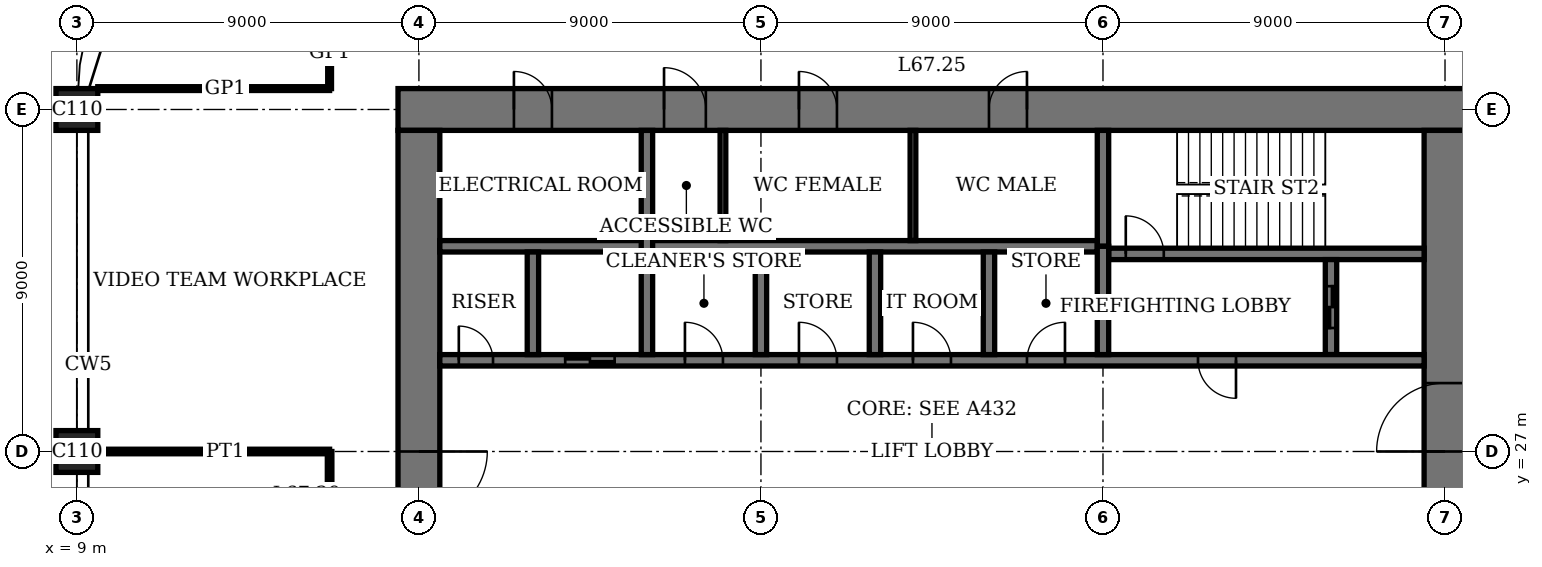
"""IFC4 building model, lengths in metres.
Left out: names, types, materials, properties, quantities, classifications, styles, units other than length and angle.
Written with IfcOpenShell. Run it as: python <this file> out.ifc"""

import sys

from ifc_helpers import new_model, si_unit, direction, frame, frame_2d, origin, origin_2d, place, context, subcontext, project, spatial, rectangle, extrude, element, fill, save


model = new_model("IFC4")
c1 = context("Model", 3, precision=1e-05, world=origin(), true_north=direction((0.0, 1.0)))
c2 = subcontext(c1, "Body", "Model", "MODEL_VIEW")
j1 = project(units=[si_unit("LENGTHUNIT", "METRE"), si_unit("PLANEANGLEUNIT", "RADIAN")], contexts=[c1])
p1 = place(None, origin())
s1 = spatial("IfcSite", under=j1, at=p1, CompositionType="ELEMENT")
p2 = place(p1, origin())
s2 = spatial("IfcBuilding", under=s1, at=p2, CompositionType="ELEMENT")
p3 = place(p2, frame((0.0, 0.0, 275.4)))
s3 = spatial("IfcBuildingStorey", under=s2, at=p3, CompositionType="ELEMENT", Elevation=275.4)
for number, where, z_axis, x_axis in (
    (1, (9.0, 27.0, 0.0), (0.0, 0.0, 1.0), (1.0, 0.0, 0.0)),
    (2, (9.0, 36.0, 0.0), (0.0, 0.0, 1.0), (1.0, 0.0, 0.0)),
):
    element("IfcColumn", number, at=place(p3, frame(where, z_axis=z_axis, x_axis=x_axis)), inside=s3, PredefinedType="COLUMN", context=c2, shape_type="SweptSolid", body=[
        extrude(rectangle(XDim=1.1, YDim=1.1, at=origin_2d()), origin(), (0.0, 0.0, 1.0), 4.0),
    ])
p4 = place(p3, frame((45.55, 36.0, 0.0), z_axis=(0.0, 0.0, 1.0), x_axis=(-1.0, 0.0, 0.0)))
e3 = element("IfcWall", 3, at=p4, inside=s3, PredefinedType="SHEAR", context=c2, shape_type="SweptSolid", body=[
    extrude(rectangle(XDim=28.1, YDim=1.1, at=frame_2d((14.05, 0.0))), origin(), (0.0, 0.0, 1.0), 4.0),
])
p5 = place(p4, frame((11.55, 0.0, 0.0)))
e4 = element("IfcOpeningElement", 4, at=p5, cuts=e3, PredefinedType="OPENING", context=c2, shape_type="SweptSolid", body=[
    extrude(rectangle(XDim=1.0, YDim=2.4, at=frame_2d((0.5, 1.2))), frame((0.0, 0.56, 0.0), z_axis=(0.0, -1.0, 0.0), x_axis=(1.0, 0.0, 0.0)), (0.0, 0.0, 1.0), 1.12),
])
p6 = place(p4, frame((16.55, 0.0, 0.0)))
e5 = element("IfcOpeningElement", 5, at=p6, cuts=e3, PredefinedType="OPENING", context=c2, shape_type="SweptSolid", body=[
    extrude(rectangle(XDim=1.0, YDim=2.4, at=frame_2d((0.5, 1.2))), frame((0.0, 0.56, 0.0), z_axis=(0.0, -1.0, 0.0), x_axis=(1.0, 0.0, 0.0)), (0.0, 0.0, 1.0), 1.12),
])
p7 = place(p4, frame((20.0, 0.0, 0.0)))
e6 = element("IfcOpeningElement", 6, at=p7, cuts=e3, PredefinedType="OPENING", context=c2, shape_type="SweptSolid", body=[
    extrude(rectangle(XDim=1.1, YDim=2.4, at=frame_2d((0.55, 1.2))), frame((0.0, 0.56, 0.0), z_axis=(0.0, -1.0, 0.0), x_axis=(1.0, 0.0, 0.0)), (0.0, 0.0, 1.0), 1.12),
])
p8 = place(p4, frame((24.05, 0.0, 0.0)))
e7 = element("IfcOpeningElement", 7, at=p8, cuts=e3, PredefinedType="OPENING", context=c2, shape_type="SweptSolid", body=[
    extrude(rectangle(XDim=1.0, YDim=2.4, at=frame_2d((0.5, 1.2))), frame((0.0, 0.56, 0.0), z_axis=(0.0, -1.0, 0.0), x_axis=(1.0, 0.0, 0.0)), (0.0, 0.0, 1.0), 1.12),
])
p9 = place(p3, frame((18.0, 35.45, 0.0), z_axis=(0.0, 0.0, 1.0), x_axis=(0.0, -1.0, 0.0)))
e8 = element("IfcWall", 8, at=p9, inside=s3, PredefinedType="SHEAR", context=c2, shape_type="SweptSolid", body=[
    extrude(rectangle(XDim=16.9, YDim=1.1, at=frame_2d((8.45, 0.0))), origin(), (0.0, 0.0, 1.0), 4.0),
])
p10 = place(p9, frame((8.45, 0.0, 0.0)))
e9 = element("IfcOpeningElement", 9, at=p10, cuts=e8, PredefinedType="OPENING", context=c2, shape_type="SweptSolid", body=[
    extrude(rectangle(XDim=1.8, YDim=2.4, at=frame_2d((0.9, 1.2))), frame((0.0, 0.56, 0.0), z_axis=(0.0, -1.0, 0.0), x_axis=(1.0, 0.0, 0.0)), (0.0, 0.0, 1.0), 1.12),
])
p11 = place(p3, frame((45.0, 18.55, 0.0), z_axis=(0.0, 0.0, 1.0), x_axis=(0.0, 1.0, 0.0)))
e10 = element("IfcWall", 10, at=p11, inside=s3, PredefinedType="SHEAR", context=c2, shape_type="SweptSolid", body=[
    extrude(rectangle(XDim=16.9, YDim=1.1, at=frame_2d((8.45, 0.0))), origin(), (0.0, 0.0, 1.0), 4.0),
])
p12 = place(p11, frame((8.45, 0.0, 0.0)))
e11 = element("IfcOpeningElement", 11, at=p12, cuts=e10, PredefinedType="OPENING", context=c2, shape_type="SweptSolid", body=[
    extrude(rectangle(XDim=1.8, YDim=2.4, at=frame_2d((0.9, 1.2))), frame((0.0, 0.56, 0.0), z_axis=(0.0, -1.0, 0.0), x_axis=(1.0, 0.0, 0.0)), (0.0, 0.0, 1.0), 1.12),
])
p13 = place(p3, frame((36.15, 32.2, 0.0), z_axis=(0.0, 0.0, 1.0), x_axis=(1.0, 0.0, 0.0)))
e12 = element("IfcWall", 12, at=p13, inside=s3, PredefinedType="SHEAR", context=c2, shape_type="SweptSolid", body=[
    extrude(rectangle(XDim=8.3, YDim=0.3, at=frame_2d((4.15, 0.0))), origin(), (0.0, 0.0, 1.0), 4.0),
])
p14 = place(p13, frame((0.45, 0.0, 0.0)))
e13 = element("IfcOpeningElement", 13, at=p14, cuts=e12, PredefinedType="OPENING", context=c2, shape_type="SweptSolid", body=[
    extrude(rectangle(XDim=1.0, YDim=2.4, at=frame_2d((0.5, 1.2))), frame((0.0, 0.16, 0.0), z_axis=(0.0, -1.0, 0.0), x_axis=(1.0, 0.0, 0.0)), (0.0, 0.0, 1.0), 0.32),
])
p15 = place(p3, frame((36.0, 32.4, 0.0), z_axis=(0.0, 0.0, 1.0), x_axis=(0.0, 1.0, 0.0)))
e14 = element("IfcWall", 14, at=p15, inside=s3, PredefinedType="SHEAR", context=c2, shape_type="SweptSolid", body=[
    extrude(rectangle(XDim=3.05, YDim=0.3, at=frame_2d((1.525, 0.0))), origin(), (0.0, 0.0, 1.0), 4.0),
])
p16 = place(p3, frame((42.0, 29.55, 0.0), z_axis=(0.0, 0.0, 1.0), x_axis=(0.0, 1.0, 0.0)))
e15 = element("IfcWall", 15, at=p16, inside=s3, PredefinedType="SHEAR", context=c2, shape_type="SweptSolid", body=[
    extrude(rectangle(XDim=2.5, YDim=0.3, at=frame_2d((1.25, 0.0))), origin(), (0.0, 0.0, 1.0), 4.0),
])
p17 = place(p16, frame((0.7, 0.0, 0.0)))
e16 = element("IfcOpeningElement", 16, at=p17, cuts=e15, PredefinedType="OPENING", context=c2, shape_type="SweptSolid", body=[
    extrude(rectangle(XDim=1.1, YDim=2.4, at=frame_2d((0.55, 1.2))), frame((0.0, 0.16, 0.0), z_axis=(0.0, -1.0, 0.0), x_axis=(1.0, 0.0, 0.0)), (0.0, 0.0, 1.0), 0.32),
])
p18 = place(p3, frame((18.55, 29.4, 0.0), z_axis=(0.0, 0.0, 1.0), x_axis=(1.0, 0.0, 0.0)))
e17 = element("IfcWall", 17, at=p18, inside=s3, PredefinedType="SHEAR", context=c2, shape_type="SweptSolid", body=[
    extrude(rectangle(XDim=25.9, YDim=0.3, at=frame_2d((12.95, 0.0))), origin(), (0.0, 0.0, 1.0), 4.0),
])
p19 = place(p18, frame((19.95, 0.0, 0.0)))
e18 = element("IfcOpeningElement", 18, at=p19, cuts=e17, PredefinedType="OPENING", context=c2, shape_type="SweptSolid", body=[
    extrude(rectangle(XDim=1.0, YDim=2.4, at=frame_2d((0.5, 1.2))), frame((0.0, 0.16, 0.0), z_axis=(0.0, -1.0, 0.0), x_axis=(1.0, 0.0, 0.0)), (0.0, 0.0, 1.0), 0.32),
])
p20 = place(p18, frame((0.5, 0.0, 0.0)))
e19 = element("IfcOpeningElement", 19, at=p20, cuts=e17, PredefinedType="OPENING", context=c2, shape_type="SweptSolid", body=[
    extrude(rectangle(XDim=0.9, YDim=2.1, at=frame_2d((0.45, 1.05))), frame((0.0, 0.16, 0.0), z_axis=(0.0, -1.0, 0.0), x_axis=(1.0, 0.0, 0.0)), (0.0, 0.0, 1.0), 0.32),
])
p21 = place(p18, frame((15.45, 0.0, 0.0)))
e20 = element("IfcOpeningElement", 20, at=p21, cuts=e17, PredefinedType="OPENING", context=c2, shape_type="SweptSolid", body=[
    extrude(rectangle(XDim=1.0, YDim=2.4, at=frame_2d((0.5, 1.2))), frame((0.0, 0.16, 0.0), z_axis=(0.0, -1.0, 0.0), x_axis=(1.0, 0.0, 0.0)), (0.0, 0.0, 1.0), 0.32),
])
p22 = place(p18, frame((12.45, 0.0, 0.0)))
e21 = element("IfcOpeningElement", 21, at=p22, cuts=e17, PredefinedType="OPENING", context=c2, shape_type="SweptSolid", body=[
    extrude(rectangle(XDim=1.0, YDim=2.4, at=frame_2d((0.5, 1.2))), frame((0.0, 0.16, 0.0), z_axis=(0.0, -1.0, 0.0), x_axis=(1.0, 0.0, 0.0)), (0.0, 0.0, 1.0), 0.32),
])
p23 = place(p18, frame((9.45, 0.0, 0.0)))
e22 = element("IfcOpeningElement", 22, at=p23, cuts=e17, PredefinedType="OPENING", context=c2, shape_type="SweptSolid", body=[
    extrude(rectangle(XDim=1.0, YDim=2.4, at=frame_2d((0.5, 1.2))), frame((0.0, 0.16, 0.0), z_axis=(0.0, -1.0, 0.0), x_axis=(1.0, 0.0, 0.0)), (0.0, 0.0, 1.0), 0.32),
])
p24 = place(p18, frame((6.45, 0.0, 0.0)))
e23 = element("IfcOpeningElement", 23, at=p24, cuts=e17, PredefinedType="OPENING", context=c2, shape_type="SweptSolid", body=[
    extrude(rectangle(XDim=1.0, YDim=2.4, at=frame_2d((0.5, 1.2))), frame((0.0, 0.16, 0.0), z_axis=(0.0, -1.0, 0.0), x_axis=(1.0, 0.0, 0.0)), (0.0, 0.0, 1.0), 0.32),
])
p25 = place(p18, frame((3.3, 0.0, 0.0)))
e24 = element("IfcOpeningElement", 24, at=p25, cuts=e17, PredefinedType="OPENING", context=c2, shape_type="SweptSolid", body=[
    extrude(rectangle(XDim=1.3, YDim=2.4, at=frame_2d((0.65, 1.2))), frame((0.0, 0.16, 0.0), z_axis=(0.0, -1.0, 0.0), x_axis=(1.0, 0.0, 0.0)), (0.0, 0.0, 1.0), 0.32),
])
p26 = place(p3, frame((18.55, 32.4, 0.0), z_axis=(0.0, 0.0, 1.0), x_axis=(1.0, 0.0, 0.0)))
e25 = element("IfcWall", 25, at=p26, inside=s3, PredefinedType="SHEAR", context=c2, shape_type="SweptSolid", body=[
    extrude(rectangle(XDim=17.3, YDim=0.3, at=frame_2d((8.65, 0.0))), origin(), (0.0, 0.0, 1.0), 4.0),
])
for number, where, z_axis, x_axis in (
    (26, (33.0, 29.55, 0.0), (0.0, 0.0, 1.0), (0.0, 1.0, 0.0)),
    (27, (30.0, 29.55, 0.0), (0.0, 0.0, 1.0), (0.0, 1.0, 0.0)),
    (28, (27.0, 29.55, 0.0), (0.0, 0.0, 1.0), (0.0, 1.0, 0.0)),
):
    element("IfcWall", number, at=place(p3, frame(where, z_axis=z_axis, x_axis=x_axis)), inside=s3, PredefinedType="SHEAR", context=c2, shape_type="SweptSolid", body=[
        extrude(rectangle(XDim=2.7, YDim=0.3, at=frame_2d((1.35, 0.0))), origin(), (0.0, 0.0, 1.0), 4.0),
    ])
p27 = place(p3, frame((24.0, 29.55, 0.0), z_axis=(0.0, 0.0, 1.0), x_axis=(0.0, 1.0, 0.0)))
e29 = element("IfcWall", 29, at=p27, inside=s3, PredefinedType="SHEAR", context=c2, shape_type="SweptSolid", body=[
    extrude(rectangle(XDim=5.9, YDim=0.3, at=frame_2d((2.95, 0.0))), origin(), (0.0, 0.0, 1.0), 4.0),
])
p28 = place(p3, frame((21.0, 29.55, 0.0), z_axis=(0.0, 0.0, 1.0), x_axis=(0.0, 1.0, 0.0)))
e30 = element("IfcWall", 30, at=p28, inside=s3, PredefinedType="SHEAR", context=c2, shape_type="SweptSolid", body=[
    extrude(rectangle(XDim=2.7, YDim=0.3, at=frame_2d((1.35, 0.0))), origin(), (0.0, 0.0, 1.0), 4.0),
])
p29 = place(p3, frame((36.0, 29.55, 0.0), z_axis=(0.0, 0.0, 1.0), x_axis=(0.0, 1.0, 0.0)))
e31 = element("IfcWall", 31, at=p29, inside=s3, PredefinedType="SHEAR", context=c2, shape_type="SweptSolid", body=[
    extrude(rectangle(XDim=2.85, YDim=0.3, at=frame_2d((1.425, 0.0))), origin(), (0.0, 0.0, 1.0), 4.0),
])
p30 = place(p3, frame((9.55, 27.0, 0.0), z_axis=(0.0, 0.0, 1.0), x_axis=(1.0, 0.0, 0.0)))
e32 = element("IfcWall", 32, at=p30, inside=s3, PredefinedType="PARTITIONING", context=c2, shape_type="SweptSolid", body=[
    extrude(rectangle(XDim=6.1, YDim=0.12, at=frame_2d((3.05, 0.0))), origin(), (0.0, 0.0, 1.0), 3.05),
])
p31 = place(p3, frame((9.55, 36.55, 0.0), z_axis=(0.0, 0.0, 1.0), x_axis=(1.0, 0.0, 0.0)))
e33 = element("IfcWall", 33, at=p31, inside=s3, PredefinedType="PARTITIONING", context=c2, shape_type="SweptSolid", body=[
    extrude(rectangle(XDim=6.1, YDim=0.1, at=frame_2d((3.05, 0.0))), origin(), (0.0, 0.0, 1.0), 3.75),
])
p32 = place(p3, frame((15.65, 22.5, 0.0), z_axis=(0.0, 0.0, 1.0), x_axis=(0.0, 1.0, 0.0)))
e34 = element("IfcWall", 34, at=p32, inside=s3, PredefinedType="PARTITIONING", context=c2, shape_type="SweptSolid", body=[
    extrude(rectangle(XDim=4.5, YDim=0.12, at=frame_2d((2.25, 0.0))), origin(), (0.0, 0.0, 1.0), 3.75),
])
p33 = place(p32, frame((1.75, 0.0, 0.0)))
e35 = element("IfcOpeningElement", 35, at=p33, cuts=e34, PredefinedType="OPENING", context=c2, shape_type="SweptSolid", body=[
    extrude(rectangle(XDim=1.0, YDim=2.4, at=frame_2d((0.5, 1.2))), frame((0.0, 0.07, 0.0), z_axis=(0.0, -1.0, 0.0), x_axis=(1.0, 0.0, 0.0)), (0.0, 0.0, 1.0), 0.14),
])
p34 = place(p3, frame((15.65, 36.55, 0.0), z_axis=(0.0, 0.0, 1.0), x_axis=(0.0, 1.0, 0.0)))
e36 = element("IfcWall", 36, at=p34, inside=s3, PredefinedType="PARTITIONING", context=c2, shape_type="SweptSolid", body=[
    extrude(rectangle(XDim=1.85, YDim=0.1, at=frame_2d((0.925, 0.0))), origin(), (0.0, 0.0, 1.0), 3.75),
])
for number, where, z_axis, x_axis in (
    (37, (31.0, 32.55, 0.0), (0.0, 0.0, 1.0), (0.0, 1.0, 0.0)),
    (38, (26.0, 32.55, 0.0), (0.0, 0.0, 1.0), (0.0, 1.0, 0.0)),
):
    element("IfcWall", number, at=place(p3, frame(where, z_axis=z_axis, x_axis=x_axis)), inside=s3, PredefinedType="PARTITIONING", context=c2, shape_type="SweptSolid", body=[
        extrude(rectangle(XDim=2.9, YDim=0.15, at=frame_2d((1.45, 0.0))), origin(), (0.0, 0.0, 1.0), 3.75),
    ])
p35 = place(p10, origin())
e39 = element("IfcDoor", 39, at=p35, inside=s3, OperationType="DOUBLE_DOOR_DOUBLE_SWING", PredefinedType="DOOR", context=c2, shape_type="SweptSolid", body=[
    extrude(rectangle(XDim=1.8, YDim=2.4, at=frame_2d((0.9, 1.2))), frame((0.0, 0.03, 0.0), z_axis=(0.0, -1.0, 0.0), x_axis=(1.0, 0.0, 0.0)), (0.0, 0.0, 1.0), 0.06),
    extrude(rectangle(XDim=0.04, YDim=2.4, at=frame_2d((0.02, 1.2))), frame((0.0, 0.55, 0.0), z_axis=(0.0, -1.0, 0.0), x_axis=(1.0, 0.0, 0.0)), (0.0, 0.0, 1.0), 1.1),
    extrude(rectangle(XDim=0.04, YDim=2.4, at=frame_2d((1.78, 1.2))), frame((0.0, 0.55, 0.0), z_axis=(0.0, -1.0, 0.0), x_axis=(1.0, 0.0, 0.0)), (0.0, 0.0, 1.0), 1.1),
    extrude(rectangle(XDim=1.8, YDim=0.04, at=frame_2d((0.9, 2.38))), frame((0.0, 0.55, 0.0), z_axis=(0.0, -1.0, 0.0), x_axis=(1.0, 0.0, 0.0)), (0.0, 0.0, 1.0), 1.1),
])
fill(e9, e39)
p36 = place(p12, origin())
e40 = element("IfcDoor", 40, at=p36, inside=s3, OperationType="DOUBLE_DOOR_DOUBLE_SWING", PredefinedType="DOOR", context=c2, shape_type="SweptSolid", body=[
    extrude(rectangle(XDim=1.8, YDim=2.4, at=frame_2d((0.9, 1.2))), frame((0.0, 0.03, 0.0), z_axis=(0.0, -1.0, 0.0), x_axis=(1.0, 0.0, 0.0)), (0.0, 0.0, 1.0), 0.06),
    extrude(rectangle(XDim=0.04, YDim=2.4, at=frame_2d((0.02, 1.2))), frame((0.0, 0.55, 0.0), z_axis=(0.0, -1.0, 0.0), x_axis=(1.0, 0.0, 0.0)), (0.0, 0.0, 1.0), 1.1),
    extrude(rectangle(XDim=0.04, YDim=2.4, at=frame_2d((1.78, 1.2))), frame((0.0, 0.55, 0.0), z_axis=(0.0, -1.0, 0.0), x_axis=(1.0, 0.0, 0.0)), (0.0, 0.0, 1.0), 1.1),
    extrude(rectangle(XDim=1.8, YDim=0.04, at=frame_2d((0.9, 2.38))), frame((0.0, 0.55, 0.0), z_axis=(0.0, -1.0, 0.0), x_axis=(1.0, 0.0, 0.0)), (0.0, 0.0, 1.0), 1.1),
])
fill(e11, e40)
p37 = place(p5, origin())
e41 = element("IfcDoor", 41, at=p37, inside=s3, OperationType="SINGLE_SWING_LEFT", PredefinedType="DOOR", context=c2, shape_type="SweptSolid", body=[
    extrude(rectangle(XDim=1.0, YDim=2.4, at=frame_2d((0.5, 1.2))), frame((0.0, 0.025, 0.0), z_axis=(0.0, -1.0, 0.0), x_axis=(1.0, 0.0, 0.0)), (0.0, 0.0, 1.0), 0.05),
    extrude(rectangle(XDim=0.04, YDim=2.4, at=frame_2d((0.02, 1.2))), frame((0.0, 0.4, 0.0), z_axis=(0.0, -1.0, 0.0), x_axis=(1.0, 0.0, 0.0)), (0.0, 0.0, 1.0), 0.8),
    extrude(rectangle(XDim=0.04, YDim=2.4, at=frame_2d((0.98, 1.2))), frame((0.0, 0.4, 0.0), z_axis=(0.0, -1.0, 0.0), x_axis=(1.0, 0.0, 0.0)), (0.0, 0.0, 1.0), 0.8),
    extrude(rectangle(XDim=1.0, YDim=0.04, at=frame_2d((0.5, 2.38))), frame((0.0, 0.4, 0.0), z_axis=(0.0, -1.0, 0.0), x_axis=(1.0, 0.0, 0.0)), (0.0, 0.0, 1.0), 0.8),
])
fill(e4, e41)
p38 = place(p6, origin())
e42 = element("IfcDoor", 42, at=p38, inside=s3, OperationType="SINGLE_SWING_RIGHT", PredefinedType="DOOR", context=c2, shape_type="SweptSolid", body=[
    extrude(rectangle(XDim=1.0, YDim=2.4, at=frame_2d((0.5, 1.2))), frame((0.0, 0.025, 0.0), z_axis=(0.0, -1.0, 0.0), x_axis=(1.0, 0.0, 0.0)), (0.0, 0.0, 1.0), 0.05),
    extrude(rectangle(XDim=0.04, YDim=2.4, at=frame_2d((0.02, 1.2))), frame((0.0, 0.4, 0.0), z_axis=(0.0, -1.0, 0.0), x_axis=(1.0, 0.0, 0.0)), (0.0, 0.0, 1.0), 0.8),
    extrude(rectangle(XDim=0.04, YDim=2.4, at=frame_2d((0.98, 1.2))), frame((0.0, 0.4, 0.0), z_axis=(0.0, -1.0, 0.0), x_axis=(1.0, 0.0, 0.0)), (0.0, 0.0, 1.0), 0.8),
    extrude(rectangle(XDim=1.0, YDim=0.04, at=frame_2d((0.5, 2.38))), frame((0.0, 0.4, 0.0), z_axis=(0.0, -1.0, 0.0), x_axis=(1.0, 0.0, 0.0)), (0.0, 0.0, 1.0), 0.8),
])
fill(e5, e42)
p39 = place(p7, origin())
e43 = element("IfcDoor", 43, at=p39, inside=s3, OperationType="SINGLE_SWING_RIGHT", PredefinedType="DOOR", context=c2, shape_type="SweptSolid", body=[
    extrude(rectangle(XDim=1.1, YDim=2.4, at=frame_2d((0.55, 1.2))), frame((0.0, 0.025, 0.0), z_axis=(0.0, -1.0, 0.0), x_axis=(1.0, 0.0, 0.0)), (0.0, 0.0, 1.0), 0.05),
    extrude(rectangle(XDim=0.04, YDim=2.4, at=frame_2d((0.02, 1.2))), frame((0.0, 0.44, 0.0), z_axis=(0.0, -1.0, 0.0), x_axis=(1.0, 0.0, 0.0)), (0.0, 0.0, 1.0), 0.88),
    extrude(rectangle(XDim=0.04, YDim=2.4, at=frame_2d((1.08, 1.2))), frame((0.0, 0.44, 0.0), z_axis=(0.0, -1.0, 0.0), x_axis=(1.0, 0.0, 0.0)), (0.0, 0.0, 1.0), 0.88),
    extrude(rectangle(XDim=1.1, YDim=0.04, at=frame_2d((0.55, 2.38))), frame((0.0, 0.44, 0.0), z_axis=(0.0, -1.0, 0.0), x_axis=(1.0, 0.0, 0.0)), (0.0, 0.0, 1.0), 0.88),
])
fill(e6, e43)
p40 = place(p8, origin())
e44 = element("IfcDoor", 44, at=p40, inside=s3, OperationType="SINGLE_SWING_RIGHT", PredefinedType="DOOR", context=c2, shape_type="SweptSolid", body=[
    extrude(rectangle(XDim=1.0, YDim=2.4, at=frame_2d((0.5, 1.2))), frame((0.0, 0.025, 0.0), z_axis=(0.0, -1.0, 0.0), x_axis=(1.0, 0.0, 0.0)), (0.0, 0.0, 1.0), 0.05),
    extrude(rectangle(XDim=0.04, YDim=2.4, at=frame_2d((0.02, 1.2))), frame((0.0, 0.4, 0.0), z_axis=(0.0, -1.0, 0.0), x_axis=(1.0, 0.0, 0.0)), (0.0, 0.0, 1.0), 0.8),
    extrude(rectangle(XDim=0.04, YDim=2.4, at=frame_2d((0.98, 1.2))), frame((0.0, 0.4, 0.0), z_axis=(0.0, -1.0, 0.0), x_axis=(1.0, 0.0, 0.0)), (0.0, 0.0, 1.0), 0.8),
    extrude(rectangle(XDim=1.0, YDim=0.04, at=frame_2d((0.5, 2.38))), frame((0.0, 0.4, 0.0), z_axis=(0.0, -1.0, 0.0), x_axis=(1.0, 0.0, 0.0)), (0.0, 0.0, 1.0), 0.8),
])
fill(e7, e44)
p41 = place(p14, origin())
e45 = element("IfcDoor", 45, at=p41, inside=s3, OperationType="SINGLE_SWING_RIGHT", PredefinedType="DOOR", context=c2, shape_type="SweptSolid", body=[
    extrude(rectangle(XDim=1.0, YDim=2.4, at=frame_2d((0.5, 1.2))), frame((0.0, 0.03, 0.0), z_axis=(0.0, -1.0, 0.0), x_axis=(1.0, 0.0, 0.0)), (0.0, 0.0, 1.0), 0.06),
])
fill(e13, e45)
p42 = place(p19, origin())
e46 = element("IfcDoor", 46, at=p42, inside=s3, OperationType="SINGLE_SWING_RIGHT", PredefinedType="DOOR", context=c2, shape_type="SweptSolid", body=[
    extrude(rectangle(XDim=1.0, YDim=2.4, at=frame_2d((0.5, 1.2))), frame((0.0, 0.03, 0.0), z_axis=(0.0, -1.0, 0.0), x_axis=(1.0, 0.0, 0.0)), (0.0, 0.0, 1.0), 0.06),
])
fill(e18, e46)
p43 = place(p20, origin())
e47 = element("IfcDoor", 47, at=p43, inside=s3, OperationType="SINGLE_SWING_RIGHT", PredefinedType="DOOR", context=c2, shape_type="SweptSolid", body=[
    extrude(rectangle(XDim=0.9, YDim=2.1, at=frame_2d((0.45, 1.05))), frame((0.0, 0.03, 0.0), z_axis=(0.0, -1.0, 0.0), x_axis=(1.0, 0.0, 0.0)), (0.0, 0.0, 1.0), 0.06),
])
fill(e19, e47)
p44 = place(p21, origin())
e48 = element("IfcDoor", 48, at=p44, inside=s3, OperationType="SINGLE_SWING_LEFT", PredefinedType="DOOR", context=c2, shape_type="SweptSolid", body=[
    extrude(rectangle(XDim=1.0, YDim=2.4, at=frame_2d((0.5, 1.2))), frame((0.0, 0.03, 0.0), z_axis=(0.0, -1.0, 0.0), x_axis=(1.0, 0.0, 0.0)), (0.0, 0.0, 1.0), 0.06),
])
fill(e20, e48)
p45 = place(p22, origin())
e49 = element("IfcDoor", 49, at=p45, inside=s3, OperationType="SINGLE_SWING_RIGHT", PredefinedType="DOOR", context=c2, shape_type="SweptSolid", body=[
    extrude(rectangle(XDim=1.0, YDim=2.4, at=frame_2d((0.5, 1.2))), frame((0.0, 0.03, 0.0), z_axis=(0.0, -1.0, 0.0), x_axis=(1.0, 0.0, 0.0)), (0.0, 0.0, 1.0), 0.06),
])
fill(e21, e49)
p46 = place(p23, origin())
e50 = element("IfcDoor", 50, at=p46, inside=s3, OperationType="SINGLE_SWING_RIGHT", PredefinedType="DOOR", context=c2, shape_type="SweptSolid", body=[
    extrude(rectangle(XDim=1.0, YDim=2.4, at=frame_2d((0.5, 1.2))), frame((0.0, 0.03, 0.0), z_axis=(0.0, -1.0, 0.0), x_axis=(1.0, 0.0, 0.0)), (0.0, 0.0, 1.0), 0.06),
])
fill(e22, e50)
p47 = place(p24, origin())
e51 = element("IfcDoor", 51, at=p47, inside=s3, OperationType="SINGLE_SWING_RIGHT", PredefinedType="DOOR", context=c2, shape_type="SweptSolid", body=[
    extrude(rectangle(XDim=1.0, YDim=2.4, at=frame_2d((0.5, 1.2))), frame((0.0, 0.03, 0.0), z_axis=(0.0, -1.0, 0.0), x_axis=(1.0, 0.0, 0.0)), (0.0, 0.0, 1.0), 0.06),
])
fill(e23, e51)
p48 = place(p25, origin())
e52 = element("IfcDoor", 52, at=p48, inside=s3, OperationType="DOUBLE_DOOR_SLIDING", PredefinedType="DOOR", context=c2, shape_type="SweptSolid", body=[
    extrude(rectangle(XDim=1.3, YDim=2.4, at=frame_2d((0.65, 1.2))), frame((0.0, 0.02, 0.0), z_axis=(0.0, -1.0, 0.0), x_axis=(1.0, 0.0, 0.0)), (0.0, 0.0, 1.0), 0.04),
])
fill(e24, e52)
p49 = place(p17, origin())
e53 = element("IfcDoor", 53, at=p49, inside=s3, OperationType="DOUBLE_DOOR_SLIDING", PredefinedType="DOOR", context=c2, shape_type="SweptSolid", body=[
    extrude(rectangle(XDim=1.1, YDim=2.4, at=frame_2d((0.55, 1.2))), frame((0.0, 0.03, 0.0), z_axis=(0.0, -1.0, 0.0), x_axis=(1.0, 0.0, 0.0)), (0.0, 0.0, 1.0), 0.06),
])
fill(e16, e53)
save(model, sys.argv[1])
